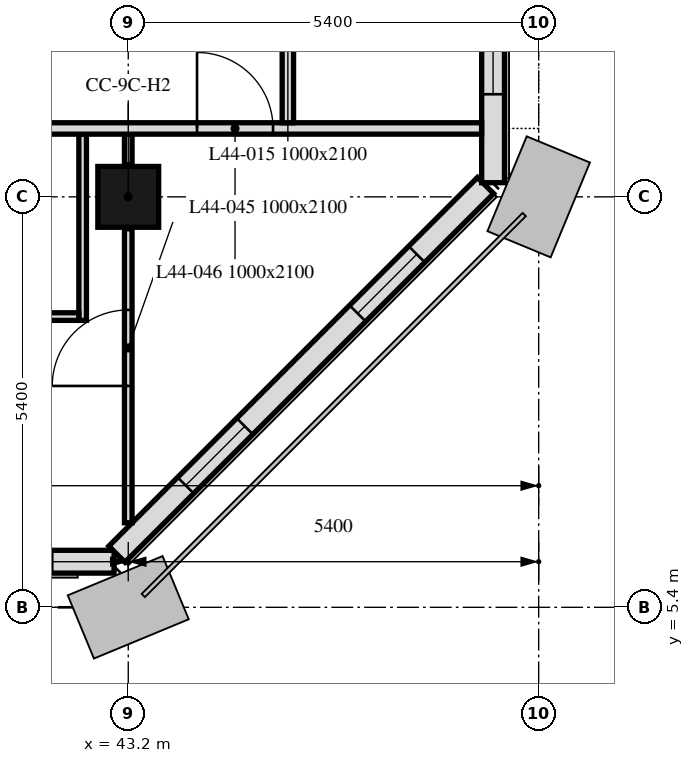
"""IFC4 building model, lengths in metres.
Left out: names, types, materials, properties, quantities, classifications, styles, units other than length and angle.
Written with IfcOpenShell. Run it as: python <this file> out.ifc"""

import sys

from ifc_helpers import new_model, si_unit, direction, frame, frame_2d, origin, origin_2d, place, context, subcontext, project, spatial, rectangle, extrude, element, fill, save


model = new_model("IFC4")
c1 = context("Model", 3, precision=1e-05, world=origin(), true_north=direction((0.0, 1.0)))
c2 = subcontext(c1, "Body", "Model", "MODEL_VIEW")
j1 = project(units=[si_unit("LENGTHUNIT", "METRE"), si_unit("PLANEANGLEUNIT", "RADIAN")], contexts=[c1])
p1 = place(None, origin())
s1 = spatial("IfcSite", under=j1, at=p1, CompositionType="ELEMENT")
p2 = place(p1, origin())
s2 = spatial("IfcBuilding", under=s1, at=p2, CompositionType="ELEMENT")
p3 = place(p2, frame((0.0, 0.0, 184.0)))
s3 = spatial("IfcBuildingStorey", under=s2, at=p3, CompositionType="ELEMENT", Elevation=184.0)
p4 = place(p3, frame((43.2, 10.8, 0.0), z_axis=(0.0, 0.0, 1.0), x_axis=(1.0, 0.0, 0.0)))
e1 = element("IfcColumn", 1, at=p4, inside=s3, PredefinedType="COLUMN", context=c2, shape_type="SweptSolid", body=[
    extrude(rectangle(XDim=0.8, YDim=0.8, at=origin_2d()), origin(), (0.0, 0.0, 1.0), 3.0),
])
p5 = place(p3, frame((10.986, 6.0, 0.0), z_axis=(0.0, 0.0, 1.0), x_axis=(1.0, 0.0, 0.0)))
e2 = element("IfcWall", 2, at=p5, inside=s3, PredefinedType="SOLIDWALL", context=c2, shape_type="SweptSolid", body=[
    extrude(rectangle(XDim=32.027, YDim=0.3, at=frame_2d((16.014, 0.0))), origin(), (0.0, 0.0, 1.0), 3.0),
])
p6 = place(p5, frame((2.764, 0.0, 0.9)))
e3 = element("IfcOpeningElement", 3, at=p6, cuts=e2, PredefinedType="OPENING", context=c2, shape_type="SweptSolid", body=[
    extrude(rectangle(XDim=1.1, YDim=1.7, at=frame_2d((0.55, 0.85))), frame((0.0, 0.16, 0.0), z_axis=(0.0, -1.0, 0.0), x_axis=(1.0, 0.0, 0.0)), (0.0, 0.0, 1.0), 0.32),
])
p7 = place(p5, frame((6.214, 0.0, 0.9)))
e4 = element("IfcOpeningElement", 4, at=p7, cuts=e2, PredefinedType="OPENING", context=c2, shape_type="SweptSolid", body=[
    extrude(rectangle(XDim=3.4, YDim=1.7, at=frame_2d((1.7, 0.85))), frame((0.0, 0.16, 0.0), z_axis=(0.0, -1.0, 0.0), x_axis=(1.0, 0.0, 0.0)), (0.0, 0.0, 1.0), 0.32),
])
p8 = place(p5, frame((13.564, 0.0, 0.9)))
e5 = element("IfcOpeningElement", 5, at=p8, cuts=e2, PredefinedType="OPENING", context=c2, shape_type="SweptSolid", body=[
    extrude(rectangle(XDim=1.1, YDim=1.7, at=frame_2d((0.55, 0.85))), frame((0.0, 0.16, 0.0), z_axis=(0.0, -1.0, 0.0), x_axis=(1.0, 0.0, 0.0)), (0.0, 0.0, 1.0), 0.32),
])
p9 = place(p5, frame((17.014, 0.0, 0.9)))
e6 = element("IfcOpeningElement", 6, at=p9, cuts=e2, PredefinedType="OPENING", context=c2, shape_type="SweptSolid", body=[
    extrude(rectangle(XDim=3.4, YDim=1.7, at=frame_2d((1.7, 0.85))), frame((0.0, 0.16, 0.0), z_axis=(0.0, -1.0, 0.0), x_axis=(1.0, 0.0, 0.0)), (0.0, 0.0, 1.0), 0.32),
])
p10 = place(p5, frame((24.364, 0.0, 0.9)))
e7 = element("IfcOpeningElement", 7, at=p10, cuts=e2, PredefinedType="OPENING", context=c2, shape_type="SweptSolid", body=[
    extrude(rectangle(XDim=1.1, YDim=1.7, at=frame_2d((0.55, 0.85))), frame((0.0, 0.16, 0.0), z_axis=(0.0, -1.0, 0.0), x_axis=(1.0, 0.0, 0.0)), (0.0, 0.0, 1.0), 0.32),
])
p11 = place(p5, frame((27.814, 0.0, 0.9)))
e8 = element("IfcOpeningElement", 8, at=p11, cuts=e2, PredefinedType="OPENING", context=c2, shape_type="SweptSolid", body=[
    extrude(rectangle(XDim=3.4, YDim=1.7, at=frame_2d((1.7, 0.85))), frame((0.0, 0.16, 0.0), z_axis=(0.0, -1.0, 0.0), x_axis=(1.0, 0.0, 0.0)), (0.0, 0.0, 1.0), 0.32),
])
p12 = place(p3, frame((43.051, 6.099, 0.0), z_axis=(0.0, 0.0, 1.0), x_axis=(0.707106781187, 0.707106781187, 0.0)))
e9 = element("IfcWall", 9, at=p12, inside=s3, PredefinedType="SOLIDWALL", context=c2, shape_type="SweptSolid", body=[
    extrude(rectangle(XDim=6.86, YDim=0.3, at=frame_2d((3.43, 0.0))), origin(), (0.0, 0.0, 1.0), 3.0),
])
p13 = place(p12, frame((1.28, 0.0, 0.9)))
e10 = element("IfcOpeningElement", 10, at=p13, cuts=e9, PredefinedType="OPENING", context=c2, shape_type="SweptSolid", body=[
    extrude(rectangle(XDim=1.1, YDim=1.7, at=frame_2d((0.55, 0.85))), frame((0.0, 0.16, 0.0), z_axis=(0.0, -1.0, 0.0), x_axis=(1.0, 0.0, 0.0)), (0.0, 0.0, 1.0), 0.32),
])
p14 = place(p12, frame((4.48, 0.0, 0.9)))
e11 = element("IfcOpeningElement", 11, at=p14, cuts=e9, PredefinedType="OPENING", context=c2, shape_type="SweptSolid", body=[
    extrude(rectangle(XDim=1.1, YDim=1.7, at=frame_2d((0.55, 0.85))), frame((0.0, 0.16, 0.0), z_axis=(0.0, -1.0, 0.0), x_axis=(1.0, 0.0, 0.0)), (0.0, 0.0, 1.0), 0.32),
])
p15 = place(p3, frame((48.0, 10.986, 0.0), z_axis=(0.0, 0.0, 1.0), x_axis=(0.0, 1.0, 0.0)))
e12 = element("IfcWall", 12, at=p15, inside=s3, PredefinedType="SOLIDWALL", context=c2, shape_type="SweptSolid", body=[
    extrude(rectangle(XDim=32.027, YDim=0.3, at=frame_2d((16.014, 0.0))), origin(), (0.0, 0.0, 1.0), 3.0),
])
p16 = place(p15, frame((1.164, 0.0, 0.9)))
e13 = element("IfcOpeningElement", 13, at=p16, cuts=e12, PredefinedType="OPENING", context=c2, shape_type="SweptSolid", body=[
    extrude(rectangle(XDim=1.1, YDim=1.7, at=frame_2d((0.55, 0.85))), frame((0.0, 0.16, 0.0), z_axis=(0.0, -1.0, 0.0), x_axis=(1.0, 0.0, 0.0)), (0.0, 0.0, 1.0), 0.32),
])
p17 = place(p15, frame((2.764, 0.0, 0.9)))
e14 = element("IfcOpeningElement", 14, at=p17, cuts=e12, PredefinedType="OPENING", context=c2, shape_type="SweptSolid", body=[
    extrude(rectangle(XDim=1.1, YDim=1.7, at=frame_2d((0.55, 0.85))), frame((0.0, 0.16, 0.0), z_axis=(0.0, -1.0, 0.0), x_axis=(1.0, 0.0, 0.0)), (0.0, 0.0, 1.0), 0.32),
])
p18 = place(p15, frame((6.214, 0.0, 0.9)))
e15 = element("IfcOpeningElement", 15, at=p18, cuts=e12, PredefinedType="OPENING", context=c2, shape_type="SweptSolid", body=[
    extrude(rectangle(XDim=3.4, YDim=1.7, at=frame_2d((1.7, 0.85))), frame((0.0, 0.16, 0.0), z_axis=(0.0, -1.0, 0.0), x_axis=(1.0, 0.0, 0.0)), (0.0, 0.0, 1.0), 0.32),
])
p19 = place(p15, frame((11.964, 0.0, 0.9)))
e16 = element("IfcOpeningElement", 16, at=p19, cuts=e12, PredefinedType="OPENING", context=c2, shape_type="SweptSolid", body=[
    extrude(rectangle(XDim=1.1, YDim=1.7, at=frame_2d((0.55, 0.85))), frame((0.0, 0.16, 0.0), z_axis=(0.0, -1.0, 0.0), x_axis=(1.0, 0.0, 0.0)), (0.0, 0.0, 1.0), 0.32),
])
p20 = place(p15, frame((13.564, 0.0, 0.9)))
e17 = element("IfcOpeningElement", 17, at=p20, cuts=e12, PredefinedType="OPENING", context=c2, shape_type="SweptSolid", body=[
    extrude(rectangle(XDim=1.1, YDim=1.7, at=frame_2d((0.55, 0.85))), frame((0.0, 0.16, 0.0), z_axis=(0.0, -1.0, 0.0), x_axis=(1.0, 0.0, 0.0)), (0.0, 0.0, 1.0), 0.32),
])
p21 = place(p15, frame((17.014, 0.0, 0.9)))
e18 = element("IfcOpeningElement", 18, at=p21, cuts=e12, PredefinedType="OPENING", context=c2, shape_type="SweptSolid", body=[
    extrude(rectangle(XDim=3.4, YDim=1.7, at=frame_2d((1.7, 0.85))), frame((0.0, 0.16, 0.0), z_axis=(0.0, -1.0, 0.0), x_axis=(1.0, 0.0, 0.0)), (0.0, 0.0, 1.0), 0.32),
])
p22 = place(p15, frame((22.764, 0.0, 0.9)))
e19 = element("IfcOpeningElement", 19, at=p22, cuts=e12, PredefinedType="OPENING", context=c2, shape_type="SweptSolid", body=[
    extrude(rectangle(XDim=1.1, YDim=1.7, at=frame_2d((0.55, 0.85))), frame((0.0, 0.16, 0.0), z_axis=(0.0, -1.0, 0.0), x_axis=(1.0, 0.0, 0.0)), (0.0, 0.0, 1.0), 0.32),
])
p23 = place(p15, frame((24.364, 0.0, 0.9)))
e20 = element("IfcOpeningElement", 20, at=p23, cuts=e12, PredefinedType="OPENING", context=c2, shape_type="SweptSolid", body=[
    extrude(rectangle(XDim=1.1, YDim=1.7, at=frame_2d((0.55, 0.85))), frame((0.0, 0.16, 0.0), z_axis=(0.0, -1.0, 0.0), x_axis=(1.0, 0.0, 0.0)), (0.0, 0.0, 1.0), 0.32),
])
p24 = place(p15, frame((28.164, 0.0, 0.9)))
e21 = element("IfcOpeningElement", 21, at=p24, cuts=e12, PredefinedType="OPENING", context=c2, shape_type="SweptSolid", body=[
    extrude(rectangle(XDim=1.1, YDim=1.7, at=frame_2d((0.55, 0.85))), frame((0.0, 0.16, 0.0), z_axis=(0.0, -1.0, 0.0), x_axis=(1.0, 0.0, 0.0)), (0.0, 0.0, 1.0), 0.32),
])
p25 = place(p15, frame((29.764, 0.0, 0.9)))
e22 = element("IfcOpeningElement", 22, at=p25, cuts=e12, PredefinedType="OPENING", context=c2, shape_type="SweptSolid", body=[
    extrude(rectangle(XDim=1.1, YDim=1.7, at=frame_2d((0.55, 0.85))), frame((0.0, 0.16, 0.0), z_axis=(0.0, -1.0, 0.0), x_axis=(1.0, 0.0, 0.0)), (0.0, 0.0, 1.0), 0.32),
])
p26 = place(p3, frame((43.2, 6.512, 0.0), z_axis=(0.0, 0.0, 1.0), x_axis=(0.0, 1.0, 0.0)))
e23 = element("IfcWall", 23, at=p26, inside=s3, PredefinedType="PARTITIONING", context=c2, shape_type="SweptSolid", body=[
    extrude(rectangle(XDim=3.868, YDim=0.1, at=frame_2d((1.934, 0.0))), origin(), (0.0, 0.0, 1.0), 3.0),
])
p27 = place(p26, frame((1.8, 0.0, 0.0)))
e24 = element("IfcOpeningElement", 24, at=p27, cuts=e23, PredefinedType="OPENING", context=c2, shape_type="SweptSolid", body=[
    extrude(rectangle(XDim=1.0, YDim=2.1, at=frame_2d((0.5, 1.05))), frame((0.0, 0.05, 0.0), z_axis=(0.0, -1.0, 0.0), x_axis=(1.0, 0.0, 0.0)), (0.0, 0.0, 1.0), 0.1),
])
p28 = place(p3, frame((43.2, 11.22, 0.0), z_axis=(0.0, 0.0, 1.0), x_axis=(0.0, 1.0, 0.0)))
e25 = element("IfcWall", 25, at=p28, inside=s3, PredefinedType="PARTITIONING", context=c2, shape_type="SweptSolid", body=[
    extrude(rectangle(XDim=0.405, YDim=0.1, at=frame_2d((0.203, 0.0))), origin(), (0.0, 0.0, 1.0), 3.0),
])
p29 = place(p3, frame((42.6, 11.625, 0.0), z_axis=(0.0, 0.0, 1.0), x_axis=(0.0, -1.0, 0.0)))
e26 = element("IfcWall", 26, at=p29, inside=s3, PredefinedType="PARTITIONING", context=c2, shape_type="SweptSolid", body=[
    extrude(rectangle(XDim=2.45, YDim=0.1, at=frame_2d((1.225, 0.0))), origin(), (0.0, 0.0, 1.0), 3.0),
])
p30 = place(p3, frame((42.55, 9.225, 0.0), z_axis=(0.0, 0.0, 1.0), x_axis=(-1.0, 0.0, 0.0)))
e27 = element("IfcWall", 27, at=p30, inside=s3, PredefinedType="PARTITIONING", context=c2, shape_type="SweptSolid", body=[
    extrude(rectangle(XDim=2.4, YDim=0.1, at=frame_2d((1.2, 0.0))), origin(), (0.0, 0.0, 1.0), 3.0),
])
p31 = place(p30, frame((1.1, 0.0, 0.0)))
e28 = element("IfcOpeningElement", 28, at=p31, cuts=e27, PredefinedType="OPENING", context=c2, shape_type="SweptSolid", body=[
    extrude(rectangle(XDim=0.9, YDim=2.1, at=frame_2d((0.45, 1.05))), frame((0.0, 0.05, 0.0), z_axis=(0.0, -1.0, 0.0), x_axis=(1.0, 0.0, 0.0)), (0.0, 0.0, 1.0), 0.1),
])
p32 = place(p3, frame((6.151, 11.7, 0.0), z_axis=(0.0, 0.0, 1.0), x_axis=(1.0, 0.0, 0.0)))
e29 = element("IfcWall", 29, at=p32, inside=s3, PredefinedType="PARTITIONING", context=c2, shape_type="SweptSolid", body=[
    extrude(rectangle(XDim=41.698, YDim=0.15, at=frame_2d((20.849, 0.0))), origin(), (0.0, 0.0, 1.0), 3.0),
])
p33 = place(p32, frame((1.449, 0.0, 0.0)))
e30 = element("IfcOpeningElement", 30, at=p33, cuts=e29, PredefinedType="OPENING", context=c2, shape_type="SweptSolid", body=[
    extrude(rectangle(XDim=1.0, YDim=2.1, at=frame_2d((0.5, 1.05))), frame((0.0, 0.075, 0.0), z_axis=(0.0, -1.0, 0.0), x_axis=(1.0, 0.0, 0.0)), (0.0, 0.0, 1.0), 0.15),
])
p34 = place(p32, frame((37.954, 0.0, 0.0)))
e31 = element("IfcOpeningElement", 31, at=p34, cuts=e29, PredefinedType="OPENING", context=c2, shape_type="SweptSolid", body=[
    extrude(rectangle(XDim=1.0, YDim=2.1, at=frame_2d((0.5, 1.05))), frame((0.0, 0.075, 0.0), z_axis=(0.0, -1.0, 0.0), x_axis=(1.0, 0.0, 0.0)), (0.0, 0.0, 1.0), 0.15),
])
p35 = place(p32, frame((12.449, 0.0, 0.0)))
e32 = element("IfcOpeningElement", 32, at=p35, cuts=e29, PredefinedType="OPENING", context=c2, shape_type="SweptSolid", body=[
    extrude(rectangle(XDim=1.0, YDim=2.1, at=frame_2d((0.5, 1.05))), frame((0.0, 0.075, 0.0), z_axis=(0.0, -1.0, 0.0), x_axis=(1.0, 0.0, 0.0)), (0.0, 0.0, 1.0), 0.15),
])
p36 = place(p32, frame((23.249, 0.0, 0.0)))
e33 = element("IfcOpeningElement", 33, at=p36, cuts=e29, PredefinedType="OPENING", context=c2, shape_type="SweptSolid", body=[
    extrude(rectangle(XDim=1.0, YDim=2.1, at=frame_2d((0.5, 1.05))), frame((0.0, 0.075, 0.0), z_axis=(0.0, -1.0, 0.0), x_axis=(1.0, 0.0, 0.0)), (0.0, 0.0, 1.0), 0.15),
])
p37 = place(p3, frame((45.3, 40.425, 0.0), z_axis=(0.0, 0.0, 1.0), x_axis=(0.0, -1.0, 0.0)))
e34 = element("IfcWall", 34, at=p37, inside=s3, PredefinedType="PARTITIONING", context=c2, shape_type="SweptSolid", body=[
    extrude(rectangle(XDim=28.65, YDim=0.15, at=frame_2d((14.325, 0.0))), origin(), (0.0, 0.0, 1.0), 2.4),
])
p38 = place(p37, frame((10.225, 0.0, 0.0)))
e35 = element("IfcOpeningElement", 35, at=p38, cuts=e34, PredefinedType="OPENING", context=c2, shape_type="SweptSolid", body=[
    extrude(rectangle(XDim=1.0, YDim=2.1, at=frame_2d((0.5, 1.05))), frame((0.0, 0.075, 0.0), z_axis=(0.0, -1.0, 0.0), x_axis=(1.0, 0.0, 0.0)), (0.0, 0.0, 1.0), 0.15),
])
p39 = place(p37, frame((25.975, 0.0, 0.0)))
e36 = element("IfcOpeningElement", 36, at=p39, cuts=e34, PredefinedType="OPENING", context=c2, shape_type="SweptSolid", body=[
    extrude(rectangle(XDim=1.0, YDim=2.1, at=frame_2d((0.5, 1.05))), frame((0.0, 0.075, 0.0), z_axis=(0.0, -1.0, 0.0), x_axis=(1.0, 0.0, 0.0)), (0.0, 0.0, 1.0), 0.15),
])
p40 = place(p37, frame((4.825, 0.0, 0.0)))
e37 = element("IfcOpeningElement", 37, at=p40, cuts=e34, PredefinedType="OPENING", context=c2, shape_type="SweptSolid", body=[
    extrude(rectangle(XDim=1.0, YDim=2.1, at=frame_2d((0.5, 1.05))), frame((0.0, 0.075, 0.0), z_axis=(0.0, -1.0, 0.0), x_axis=(1.0, 0.0, 0.0)), (0.0, 0.0, 1.0), 0.15),
])
p41 = place(p37, frame((19.675, 0.0, 0.0)))
e38 = element("IfcOpeningElement", 38, at=p41, cuts=e34, PredefinedType="OPENING", context=c2, shape_type="SweptSolid", body=[
    extrude(rectangle(XDim=1.0, YDim=2.1, at=frame_2d((0.5, 1.05))), frame((0.0, 0.075, 0.0), z_axis=(0.0, -1.0, 0.0), x_axis=(1.0, 0.0, 0.0)), (0.0, 0.0, 1.0), 0.15),
])
p42 = place(p13, origin())
e39 = element("IfcWindow", 39, at=p42, inside=s3, PartitioningType="SINGLE_PANEL", PredefinedType="WINDOW", context=c2, shape_type="SweptSolid", body=[
    extrude(rectangle(XDim=1.1, YDim=1.7, at=frame_2d((0.55, 0.85))), frame((0.0, 0.03, 0.0), z_axis=(0.0, -1.0, 0.0), x_axis=(1.0, 0.0, 0.0)), (0.0, 0.0, 1.0), 0.06),
])
fill(e10, e39)
p43 = place(p14, origin())
e40 = element("IfcWindow", 40, at=p43, inside=s3, PartitioningType="SINGLE_PANEL", PredefinedType="WINDOW", context=c2, shape_type="SweptSolid", body=[
    extrude(rectangle(XDim=1.1, YDim=1.7, at=frame_2d((0.55, 0.85))), frame((0.0, 0.03, 0.0), z_axis=(0.0, -1.0, 0.0), x_axis=(1.0, 0.0, 0.0)), (0.0, 0.0, 1.0), 0.06),
])
fill(e11, e40)
p44 = place(p16, origin())
e41 = element("IfcWindow", 41, at=p44, inside=s3, PartitioningType="SINGLE_PANEL", PredefinedType="WINDOW", context=c2, shape_type="SweptSolid", body=[
    extrude(rectangle(XDim=1.1, YDim=1.7, at=frame_2d((0.55, 0.85))), frame((0.0, 0.03, 0.0), z_axis=(0.0, -1.0, 0.0), x_axis=(1.0, 0.0, 0.0)), (0.0, 0.0, 1.0), 0.06),
])
fill(e13, e41)
p45 = place(p27, origin())
e42 = element("IfcDoor", 42, at=p45, inside=s3, OperationType="SINGLE_SWING_RIGHT", PredefinedType="DOOR", context=c2, shape_type="SweptSolid", body=[
    extrude(rectangle(XDim=1.0, YDim=2.1, at=frame_2d((0.5, 1.05))), frame((0.0, 0.025, 0.0), z_axis=(0.0, -1.0, 0.0), x_axis=(1.0, 0.0, 0.0)), (0.0, 0.0, 1.0), 0.05),
])
fill(e24, e42)
p46 = place(p34, origin())
e43 = element("IfcDoor", 43, at=p46, inside=s3, OperationType="SINGLE_SWING_RIGHT", PredefinedType="DOOR", context=c2, shape_type="SweptSolid", body=[
    extrude(rectangle(XDim=1.0, YDim=2.1, at=frame_2d((0.5, 1.05))), frame((0.0, 0.025, 0.0), z_axis=(0.0, -1.0, 0.0), x_axis=(1.0, 0.0, 0.0)), (0.0, 0.0, 1.0), 0.05),
])
fill(e31, e43)
save(model, sys.argv[1])
